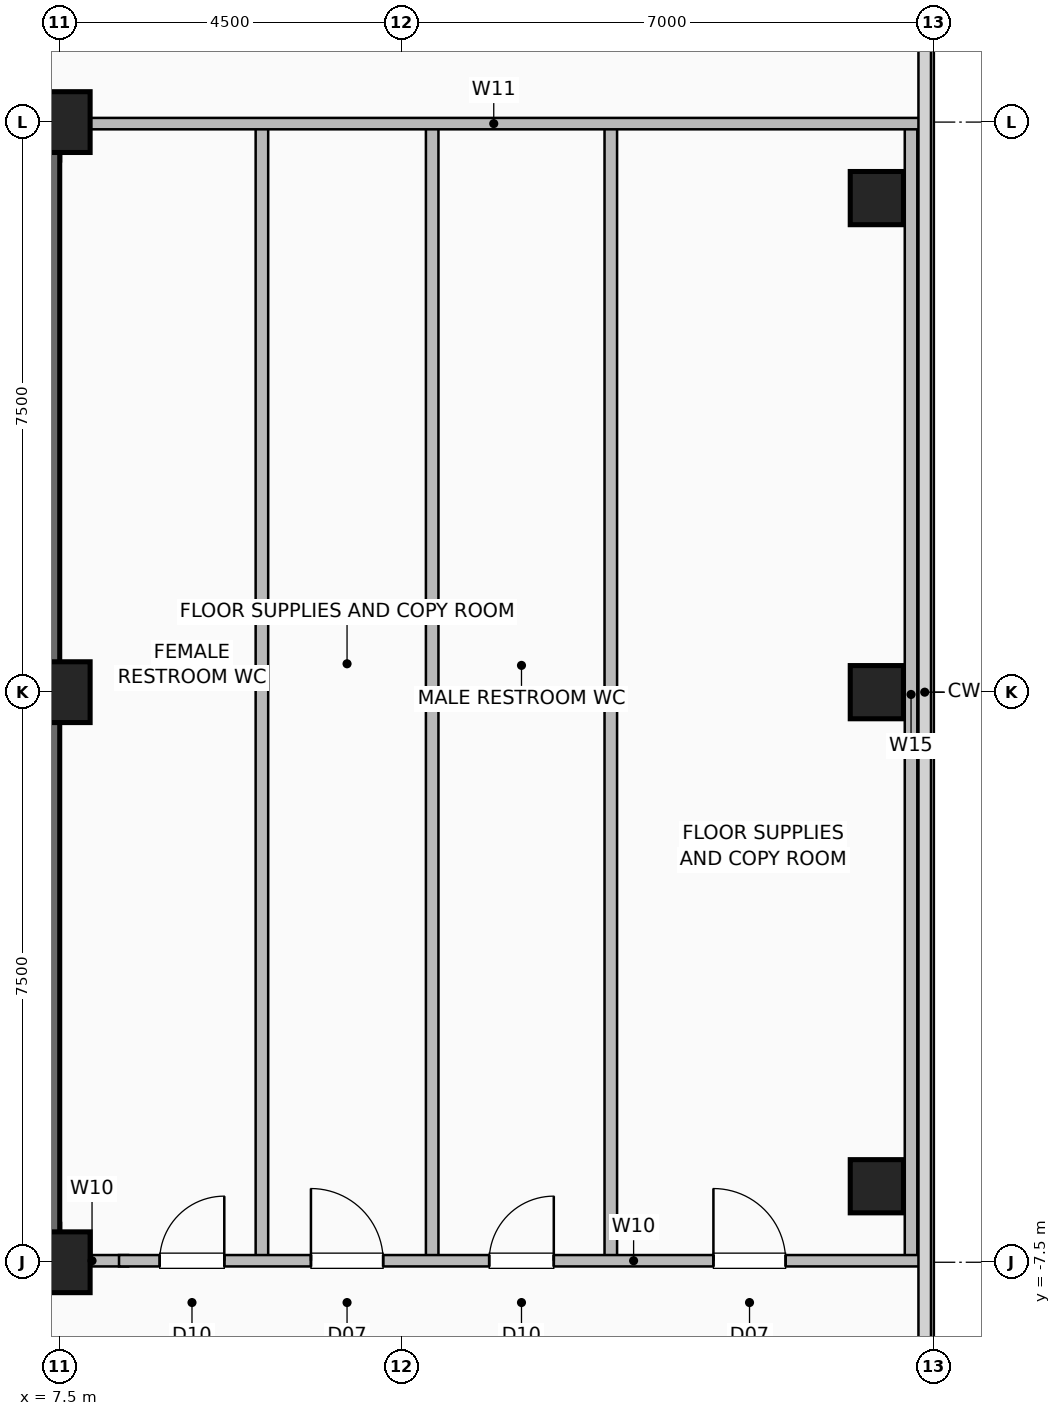
"""IFC4 building model, lengths in metres.
Left out: names, types, materials, properties, quantities, classifications, styles, units other than length and angle.
Written with IfcOpenShell. Run it as: python <this file> out.ifc"""

import sys

from ifc_helpers import new_model, si_unit, direction, frame, frame_2d, origin, origin_2d, place, context, subcontext, project, spatial, rectangle, hollow_rectangle, extrude, element, fill, save


model = new_model("IFC4")
c1 = context("Model", 3, precision=1e-05, world=origin(), true_north=direction((0.0, 1.0)))
c2 = subcontext(c1, "Body", "Model", "MODEL_VIEW")
j1 = project(units=[si_unit("LENGTHUNIT", "METRE"), si_unit("PLANEANGLEUNIT", "RADIAN")], contexts=[c1])
p1 = place(None, origin())
s1 = spatial("IfcSite", under=j1, at=p1, CompositionType="ELEMENT")
p2 = place(p1, origin())
s2 = spatial("IfcBuilding", under=s1, at=p2, CompositionType="ELEMENT")
p3 = place(p2, frame((0.0, 0.0, 254.0)))
s3 = spatial("IfcBuildingStorey", under=s2, at=p3, CompositionType="ELEMENT", Elevation=254.0)
for number, where, z_axis, x_axis in (
    (1, (7.5, -7.5, 0.0), (0.0, 0.0, 1.0), (1.0, 0.0, 0.0)),
    (2, (7.5, 0.0, 0.0), (0.0, 0.0, 1.0), (1.0, 0.0, 0.0)),
    (3, (7.5, 7.5, 0.0), (0.0, 0.0, 1.0), (1.0, 0.0, 0.0)),
):
    element("IfcColumn", number, at=place(p3, frame(where, z_axis=z_axis, x_axis=x_axis)), inside=s3, PredefinedType="COLUMN", context=c2, shape_type="SweptSolid", body=[
        extrude(hollow_rectangle(XDim=0.8, YDim=0.8, WallThickness=0.04, at=origin_2d()), origin(), (0.0, 0.0, 1.0), 3.6),
    ])
for number, where, z_axis, x_axis in (
    (4, (18.25, -6.5, 0.0), (0.0, 0.0, 1.0), (1.0, 0.0, 0.0)),
    (5, (18.25, 0.0, 0.0), (0.0, 0.0, 1.0), (1.0, 0.0, 0.0)),
    (6, (18.25, 6.5, 0.0), (0.0, 0.0, 1.0), (1.0, 0.0, 0.0)),
):
    element("IfcColumn", number, at=place(p3, frame(where, z_axis=z_axis, x_axis=x_axis)), inside=s3, PredefinedType="COLUMN", context=c2, shape_type="SweptSolid", body=[
        extrude(hollow_rectangle(XDim=0.7, YDim=0.7, WallThickness=0.035, at=origin_2d()), origin(), (0.0, 0.0, 1.0), 3.6),
    ])
p4 = place(p3, frame((-7.5, -7.25, 0.0), z_axis=(0.0, 0.0, 1.0), x_axis=(1.0, 0.0, 0.0)))
e7 = element("IfcWall", 7, at=p4, inside=s3, PredefinedType="SHEAR", context=c2, shape_type="SweptSolid", body=[
    extrude(rectangle(XDim=15.0, YDim=0.5, at=frame_2d((7.5, 0.0))), origin(), (0.0, 0.0, 1.0), 3.36),
])
p5 = place(p4, frame((1.55, 0.0, 0.0)))
e8 = element("IfcOpeningElement", 8, at=p5, cuts=e7, PredefinedType="OPENING", context=c2, shape_type="SweptSolid", body=[
    extrude(rectangle(XDim=1.05, YDim=2.08, at=frame_2d((0.525, 1.04))), frame((0.0, 0.26, 0.0), z_axis=(0.0, -1.0, 0.0), x_axis=(1.0, 0.0, 0.0)), (0.0, 0.0, 1.0), 0.52),
])
p6 = place(p4, frame((12.4, 0.0, 0.0)))
e9 = element("IfcOpeningElement", 9, at=p6, cuts=e7, PredefinedType="OPENING", context=c2, shape_type="SweptSolid", body=[
    extrude(rectangle(XDim=1.05, YDim=2.08, at=frame_2d((0.525, 1.04))), frame((0.0, 0.26, 0.0), z_axis=(0.0, -1.0, 0.0), x_axis=(1.0, 0.0, 0.0)), (0.0, 0.0, 1.0), 0.52),
])
p7 = place(p4, frame((5.2, 0.0, 0.0)))
e10 = element("IfcOpeningElement", 10, at=p7, cuts=e7, PredefinedType="OPENING", context=c2, shape_type="SweptSolid", body=[
    extrude(rectangle(XDim=1.0, YDim=2.08, at=frame_2d((0.5, 1.04))), frame((0.0, 0.26, 0.0), z_axis=(0.0, -1.0, 0.0), x_axis=(1.0, 0.0, 0.0)), (0.0, 0.0, 1.0), 0.52),
])
p8 = place(p4, frame((8.65, 0.0, 0.0)))
e11 = element("IfcOpeningElement", 11, at=p8, cuts=e7, PredefinedType="OPENING", context=c2, shape_type="SweptSolid", body=[
    extrude(rectangle(XDim=1.0, YDim=2.08, at=frame_2d((0.5, 1.04))), frame((0.0, 0.26, 0.0), z_axis=(0.0, -1.0, 0.0), x_axis=(1.0, 0.0, 0.0)), (0.0, 0.0, 1.0), 0.52),
])
for number, where, z_axis, x_axis in (
    (12, (-7.5, 7.25, 0.0), (0.0, 0.0, 1.0), (1.0, 0.0, 0.0)),
    (13, (7.25, -7.5, 0.0), (0.0, 0.0, 1.0), (0.0, 1.0, 0.0)),
):
    element("IfcWall", number, at=place(p3, frame(where, z_axis=z_axis, x_axis=x_axis)), inside=s3, PredefinedType="SHEAR", context=c2, shape_type="SweptSolid", body=[
        extrude(rectangle(XDim=15.0, YDim=0.5, at=frame_2d((7.5, 0.0))), origin(), (0.0, 0.0, 1.0), 3.36),
    ])
p9 = place(p3, frame((7.45, -7.48, 0.0), z_axis=(0.0, 0.0, 1.0), x_axis=(1.0, 0.0, 0.0)))
e14 = element("IfcWall", 14, at=p9, inside=s3, PredefinedType="PARTITIONING", context=c2, shape_type="SweptSolid", body=[
    extrude(rectangle(XDim=0.95, YDim=0.15, at=frame_2d((0.475, 0.0))), origin(), (0.0, 0.0, 1.0), 3.36),
])
for number, where, z_axis, x_axis in (
    (15, (10.16, -7.48, 0.0), (0.0, 0.0, 1.0), (0.0, 1.0, 0.0)),
    (16, (14.75, -7.48, 0.0), (0.0, 0.0, 1.0), (0.0, 1.0, 0.0)),
    (17, (12.4, -7.48, 0.0), (0.0, 0.0, 1.0), (0.0, 1.0, 0.0)),
    (18, (18.7, -7.48, 0.0), (0.0, 0.0, 1.0), (0.0, 1.0, 0.0)),
):
    element("IfcWall", number, at=place(p3, frame(where, z_axis=z_axis, x_axis=x_axis)), inside=s3, PredefinedType="PLUMBINGWALL", context=c2, shape_type="SweptSolid", body=[
        extrude(rectangle(XDim=14.9, YDim=0.165, at=frame_2d((7.45, 0.0))), origin(), (0.0, 0.0, 1.0), 3.36),
    ])
p10 = place(p3, frame((8.28, -7.48, 0.0), z_axis=(0.0, 0.0, 1.0), x_axis=(1.0, 0.0, 0.0)))
e19 = element("IfcWall", 19, at=p10, inside=s3, PredefinedType="PARTITIONING", context=c2, shape_type="SweptSolid", body=[
    extrude(rectangle(XDim=10.54, YDim=0.15, at=frame_2d((5.27, 0.0))), origin(), (0.0, 0.0, 1.0), 3.36),
])
p11 = place(p10, frame((0.535, 0.0, 0.0)))
e20 = element("IfcOpeningElement", 20, at=p11, cuts=e19, PredefinedType="OPENING", context=c2, shape_type="SweptSolid", body=[
    extrude(rectangle(XDim=0.85, YDim=2.05, at=frame_2d((0.425, 1.025))), frame((0.0, 0.085, 0.0), z_axis=(0.0, -1.0, 0.0), x_axis=(1.0, 0.0, 0.0)), (0.0, 0.0, 1.0), 0.17),
])
p12 = place(p10, frame((2.525, 0.0, 0.0)))
e21 = element("IfcOpeningElement", 21, at=p12, cuts=e19, PredefinedType="OPENING", context=c2, shape_type="SweptSolid", body=[
    extrude(rectangle(XDim=0.95, YDim=2.06, at=frame_2d((0.475, 1.03))), frame((0.0, 0.085, 0.0), z_axis=(0.0, -1.0, 0.0), x_axis=(1.0, 0.0, 0.0)), (0.0, 0.0, 1.0), 0.17),
])
p13 = place(p10, frame((4.87, 0.0, 0.0)))
e22 = element("IfcOpeningElement", 22, at=p13, cuts=e19, PredefinedType="OPENING", context=c2, shape_type="SweptSolid", body=[
    extrude(rectangle(XDim=0.85, YDim=2.05, at=frame_2d((0.425, 1.025))), frame((0.0, 0.085, 0.0), z_axis=(0.0, -1.0, 0.0), x_axis=(1.0, 0.0, 0.0)), (0.0, 0.0, 1.0), 0.17),
])
p14 = place(p10, frame((7.82, 0.0, 0.0)))
e23 = element("IfcOpeningElement", 23, at=p14, cuts=e19, PredefinedType="OPENING", context=c2, shape_type="SweptSolid", body=[
    extrude(rectangle(XDim=0.95, YDim=2.06, at=frame_2d((0.475, 1.03))), frame((0.0, 0.085, 0.0), z_axis=(0.0, -1.0, 0.0), x_axis=(1.0, 0.0, 0.0)), (0.0, 0.0, 1.0), 0.17),
])
p15 = place(p3, frame((7.6, 7.48, 0.0), z_axis=(0.0, 0.0, 1.0), x_axis=(1.0, 0.0, 0.0)))
e24 = element("IfcWall", 24, at=p15, inside=s3, PredefinedType="PARTITIONING", context=c2, shape_type="SweptSolid", body=[
    extrude(rectangle(XDim=11.22, YDim=0.15, at=frame_2d((5.61, 0.0))), origin(), (0.0, 0.0, 1.0), 3.36),
])
p16 = place(p11, origin())
e25 = element("IfcDoor", 25, at=p16, inside=s3, OperationType="SINGLE_SWING_RIGHT", PredefinedType="DOOR", context=c2, shape_type="SweptSolid", body=[
    extrude(rectangle(XDim=0.85, YDim=2.05, at=frame_2d((0.425, 1.025))), frame((0.0, 0.025, 0.0), z_axis=(0.0, -1.0, 0.0), x_axis=(1.0, 0.0, 0.0)), (0.0, 0.0, 1.0), 0.05),
])
fill(e20, e25)
p17 = place(p12, origin())
e26 = element("IfcDoor", 26, at=p17, inside=s3, OperationType="SINGLE_SWING_LEFT", PredefinedType="DOOR", context=c2, shape_type="SweptSolid", body=[
    extrude(rectangle(XDim=0.95, YDim=2.06, at=frame_2d((0.475, 1.03))), frame((0.0, 0.025, 0.0), z_axis=(0.0, -1.0, 0.0), x_axis=(1.0, 0.0, 0.0)), (0.0, 0.0, 1.0), 0.05),
])
fill(e21, e26)
p18 = place(p13, origin())
e27 = element("IfcDoor", 27, at=p18, inside=s3, OperationType="SINGLE_SWING_RIGHT", PredefinedType="DOOR", context=c2, shape_type="SweptSolid", body=[
    extrude(rectangle(XDim=0.85, YDim=2.05, at=frame_2d((0.425, 1.025))), frame((0.0, 0.025, 0.0), z_axis=(0.0, -1.0, 0.0), x_axis=(1.0, 0.0, 0.0)), (0.0, 0.0, 1.0), 0.05),
])
fill(e22, e27)
p19 = place(p14, origin())
e28 = element("IfcDoor", 28, at=p19, inside=s3, OperationType="SINGLE_SWING_LEFT", PredefinedType="DOOR", context=c2, shape_type="SweptSolid", body=[
    extrude(rectangle(XDim=0.95, YDim=2.06, at=frame_2d((0.475, 1.03))), frame((0.0, 0.025, 0.0), z_axis=(0.0, -1.0, 0.0), x_axis=(1.0, 0.0, 0.0)), (0.0, 0.0, 1.0), 0.05),
])
fill(e23, e28)
save(model, sys.argv[1])
